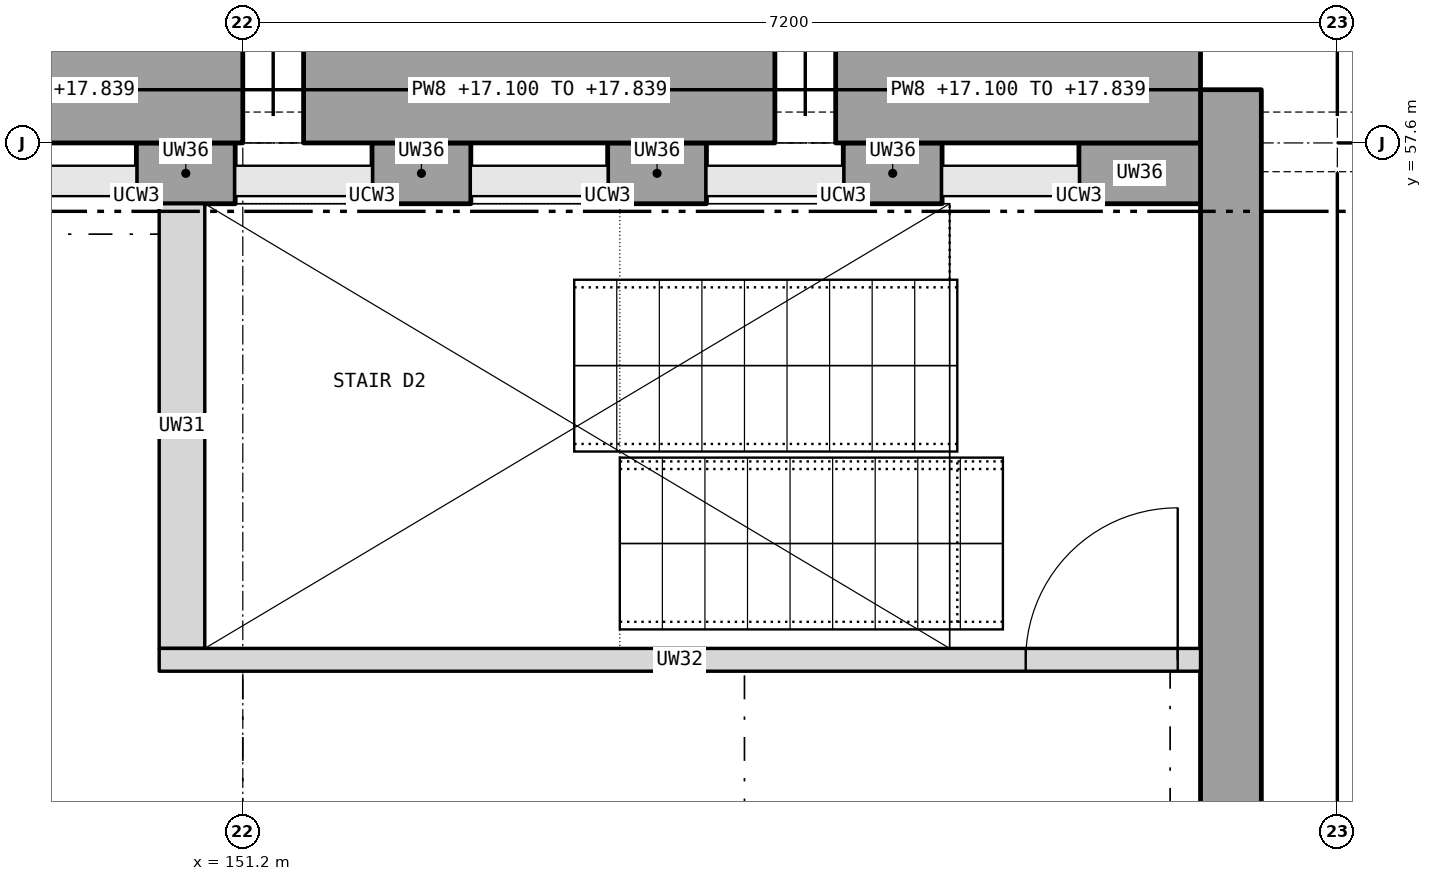
"""IFC4 building model, lengths in metres.
Left out: names, types, materials, properties, quantities, classifications, styles, units other than length and angle.
Written with IfcOpenShell. Run it as: python <this file> out.ifc"""

import sys

from ifc_helpers import new_model, si_unit, direction, frame, frame_2d, origin, place, context, subcontext, project, spatial, rectangle, extrude, element, fill, save


model = new_model("IFC4")
c1 = context("Model", 3, precision=1e-05, world=origin(), true_north=direction((0.0, 1.0)))
c2 = subcontext(c1, "Body", "Model", "MODEL_VIEW")
j1 = project(units=[si_unit("LENGTHUNIT", "METRE"), si_unit("PLANEANGLEUNIT", "RADIAN")], contexts=[c1])
p1 = place(None, origin())
s1 = spatial("IfcSite", under=j1, at=p1, CompositionType="ELEMENT")
p2 = place(p1, origin())
s2 = spatial("IfcBuilding", under=s1, at=p2, CompositionType="ELEMENT")
p3 = place(p2, frame((0.0, 0.0, 16.5)))
s3 = spatial("IfcBuildingStorey", under=s2, at=p3, CompositionType="ELEMENT", Elevation=16.5)
p4 = place(p3, frame((157.7, 36.0, 0.0), z_axis=(0.0, 0.0, 1.0), x_axis=(0.0, 1.0, 0.0)))
e1 = element("IfcWall", 1, at=p4, inside=s3, PredefinedType="SHEAR", context=c2, shape_type="SweptSolid", body=[
    extrude(rectangle(XDim=21.95, YDim=0.4, at=frame_2d((10.975, 0.0))), origin(), (0.0, 0.0, 1.0), 3.05),
])
p5 = place(p4, frame((10.3, 0.0, 0.9)))
e2 = element("IfcOpeningElement", 2, at=p5, cuts=e1, PredefinedType="OPENING", context=c2, shape_type="SweptSolid", body=[
    extrude(rectangle(XDim=1.0, YDim=1.5, at=frame_2d((0.5, 0.75))), frame((0.0, 0.21, 0.0), z_axis=(0.0, -1.0, 0.0), x_axis=(1.0, 0.0, 0.0)), (0.0, 0.0, 1.0), 0.42),
])
for number, where, z_axis, x_axis in (
    (3, (150.5, 57.4, 0.0), (0.0, 0.0, 1.0), (1.0, 0.0, 0.0)),
    (4, (152.05, 57.4, 0.0), (0.0, 0.0, 1.0), (1.0, 0.0, 0.0)),
    (5, (153.6, 57.4, 0.0), (0.0, 0.0, 1.0), (1.0, 0.0, 0.0)),
):
    element("IfcWall", number, at=place(p3, frame(where, z_axis=z_axis, x_axis=x_axis)), inside=s3, PredefinedType="SOLIDWALL", context=c2, shape_type="SweptSolid", body=[
        extrude(rectangle(XDim=0.65, YDim=0.4, at=frame_2d((0.325, 0.0))), origin(), (0.0, 0.0, 1.0), 3.05),
    ])
p6 = place(p3, frame((155.15, 57.4, 0.0), z_axis=(0.0, 0.0, 1.0), x_axis=(1.0, 0.0, 0.0)))
e6 = element("IfcWall", 6, at=p6, inside=s3, PredefinedType="SOLIDWALL", context=c2, shape_type="SweptSolid", body=[
    extrude(rectangle(XDim=0.65, YDim=0.4, at=frame_2d((0.325, 0.0))), origin(), (0.0, 0.0, 1.0), 3.05),
])
p7 = place(p3, frame((156.7, 57.4, 0.0), z_axis=(0.0, 0.0, 1.0), x_axis=(1.0, 0.0, 0.0)))
e7 = element("IfcWall", 7, at=p7, inside=s3, PredefinedType="SOLIDWALL", context=c2, shape_type="SweptSolid", body=[
    extrude(rectangle(XDim=0.8, YDim=0.4, at=frame_2d((0.4, 0.0))), origin(), (0.0, 0.0, 1.0), 3.05),
])
p8 = place(p3, frame((150.8, 54.275, 0.0), z_axis=(0.0, 0.0, 1.0), x_axis=(0.0, 1.0, 0.0)))
e8 = element("IfcWall", 8, at=p8, inside=s3, PredefinedType="SHEAR", context=c2, shape_type="SweptSolid", body=[
    extrude(rectangle(XDim=2.925, YDim=0.3, at=frame_2d((1.462, 0.0))), origin(), (0.0, 0.0, 1.0), 3.05),
])
p9 = place(p3, frame((150.65, 54.2, 0.0), z_axis=(0.0, 0.0, 1.0), x_axis=(1.0, 0.0, 0.0)))
e9 = element("IfcWall", 9, at=p9, inside=s3, PredefinedType="SHEAR", context=c2, shape_type="SweptSolid", body=[
    extrude(rectangle(XDim=6.85, YDim=0.15, at=frame_2d((3.425, 0.0))), origin(), (0.0, 0.0, 1.0), 3.05),
])
p10 = place(p9, frame((5.7, 0.0, 0.0)))
e10 = element("IfcOpeningElement", 10, at=p10, cuts=e9, PredefinedType="OPENING", context=c2, shape_type="SweptSolid", body=[
    extrude(rectangle(XDim=1.0, YDim=2.1, at=frame_2d((0.5, 1.05))), frame((0.0, 0.085, 0.0), z_axis=(0.0, -1.0, 0.0), x_axis=(1.0, 0.0, 0.0)), (0.0, 0.0, 1.0), 0.17),
])
for number, where, z_axis, x_axis in (
    (11, (148.1, 57.95, 0.6), (0.0, 0.0, 1.0), (1.0, 0.0, 0.0)),
    (12, (151.6, 57.95, 0.6), (0.0, 0.0, 1.0), (1.0, 0.0, 0.0)),
):
    element("IfcWall", number, at=place(p3, frame(where, z_axis=z_axis, x_axis=x_axis)), inside=s3, PredefinedType="SOLIDWALL", context=c2, shape_type="SweptSolid", body=[
        extrude(rectangle(XDim=3.1, YDim=0.7, at=frame_2d((1.55, 0.0))), origin(), (0.0, 0.0, 1.0), 0.739),
    ])
p11 = place(p3, frame((155.1, 57.95, 0.6), z_axis=(0.0, 0.0, 1.0), x_axis=(1.0, 0.0, 0.0)))
e13 = element("IfcWall", 13, at=p11, inside=s3, PredefinedType="SOLIDWALL", context=c2, shape_type="SweptSolid", body=[
    extrude(rectangle(XDim=2.4, YDim=0.7, at=frame_2d((1.2, 0.0))), origin(), (0.0, 0.0, 1.0), 0.739),
])
p12 = place(p10, origin())
e14 = element("IfcDoor", 14, at=p12, inside=s3, OperationType="SINGLE_SWING_RIGHT", PredefinedType="DOOR", context=c2, shape_type="SweptSolid", body=[
    extrude(rectangle(XDim=1.0, YDim=2.1, at=frame_2d((0.5, 1.05))), frame((0.0, 0.025, 0.0), z_axis=(0.0, -1.0, 0.0), x_axis=(1.0, 0.0, 0.0)), (0.0, 0.0, 1.0), 0.05),
])
fill(e10, e14)
save(model, sys.argv[1])
